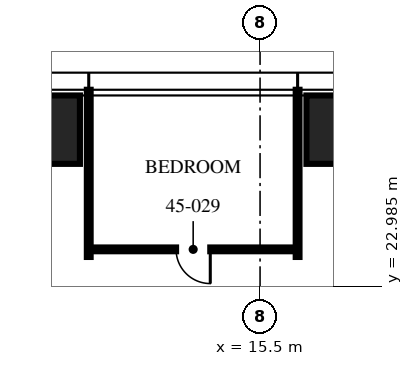
"""IFC4 building model, lengths in metres.
Left out: names, types, materials, properties, quantities, classifications, styles, units other than length and angle.
Written with IfcOpenShell. Run it as: python <this file> out.ifc"""

import sys

from ifc_helpers import new_model, si_unit, direction, frame, frame_2d, origin, origin_2d, place, context, subcontext, project, spatial, rectangle, hollow_rectangle, extrude, element, fill, save


model = new_model("IFC4")
c1 = context("Model", 3, precision=1e-05, world=origin(), true_north=direction((0.0, 1.0)))
c2 = subcontext(c1, "Body", "Model", "MODEL_VIEW")
j1 = project(units=[si_unit("LENGTHUNIT", "METRE"), si_unit("PLANEANGLEUNIT", "RADIAN")], contexts=[c1])
p1 = place(None, origin())
s1 = spatial("IfcSite", under=j1, at=p1, CompositionType="ELEMENT")
p2 = place(p1, origin())
s2 = spatial("IfcBuilding", under=s1, at=p2, CompositionType="ELEMENT")
p3 = place(p2, frame((0.0, 0.0, 178.5)))
s3 = spatial("IfcBuildingStorey", under=s2, at=p3, CompositionType="ELEMENT", Elevation=178.5)
for number, where, z_axis, x_axis in (
    (1, (9.16, 27.1, 0.0), (0.0, 0.0, 1.0), (1.0, 0.0, 0.0)),
    (2, (18.32, 27.1, 0.0), (0.0, 0.0, 1.0), (1.0, 0.0, 0.0)),
):
    element("IfcColumn", number, at=place(p3, frame(where, z_axis=z_axis, x_axis=x_axis)), inside=s3, PredefinedType="COLUMN", context=c2, shape_type="SweptSolid", body=[
        extrude(hollow_rectangle(XDim=3.2, YDim=1.8, WallThickness=0.2, at=origin_2d()), origin(), (0.0, 0.0, 1.0), 3.75),
    ])
for number, where, z_axis, x_axis in (
    (3, (16.488, 23.75, 0.0), (0.0, 0.0, 1.0), (0.0, 1.0, 0.0)),
    (4, (10.992, 23.75, 0.0), (0.0, 0.0, 1.0), (0.0, 1.0, 0.0)),
):
    element("IfcWall", number, at=place(p3, frame(where, z_axis=z_axis, x_axis=x_axis)), inside=s3, PredefinedType="PARTITIONING", context=c2, shape_type="SweptSolid", body=[
        extrude(rectangle(XDim=4.4, YDim=0.1, at=frame_2d((2.2, 0.0))), origin(), (0.0, 0.0, 1.0), 2.81),
    ])
p4 = place(p3, frame((16.488, 23.95, 0.0), z_axis=(0.0, 0.0, 1.0), x_axis=(-1.0, 0.0, 0.0)))
e5 = element("IfcWall", 5, at=p4, inside=s3, PredefinedType="PARTITIONING", context=c2, shape_type="SweptSolid", body=[
    extrude(rectangle(XDim=5.496, YDim=0.1, at=frame_2d((2.748, 0.0))), origin(), (0.0, 0.0, 1.0), 2.81),
])
p5 = place(p4, frame((2.298, 0.0, 0.0)))
e6 = element("IfcOpeningElement", 6, at=p5, cuts=e5, PredefinedType="OPENING", context=c2, shape_type="SweptSolid", body=[
    extrude(rectangle(XDim=0.9, YDim=2.1, at=frame_2d((0.45, 1.05))), frame((0.0, 0.06, 0.0), z_axis=(0.0, -1.0, 0.0), x_axis=(1.0, 0.0, 0.0)), (0.0, 0.0, 1.0), 0.12),
])
p6 = place(p5, origin())
e7 = element("IfcDoor", 7, at=p6, inside=s3, OperationType="SINGLE_SWING_LEFT", PredefinedType="DOOR", context=c2, shape_type="SweptSolid", body=[
    extrude(rectangle(XDim=0.9, YDim=2.1, at=frame_2d((0.45, 1.05))), frame((0.0, 0.025, 0.0), z_axis=(0.0, -1.0, 0.0), x_axis=(1.0, 0.0, 0.0)), (0.0, 0.0, 1.0), 0.05),
])
fill(e6, e7)
save(model, sys.argv[1])
